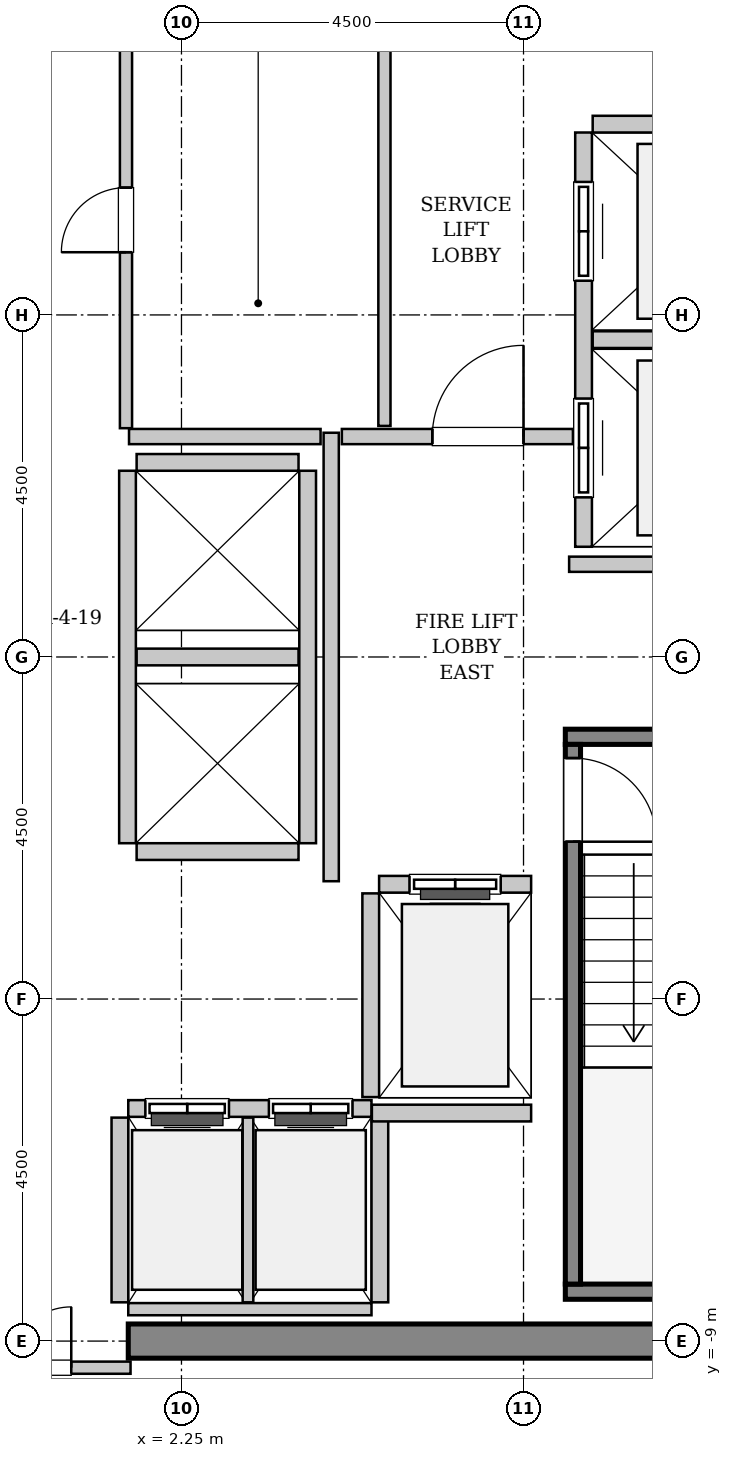
"""IFC4 building model, lengths in metres.
Left out: names, types, materials, properties, quantities, classifications, styles, units other than length and angle.
Written with IfcOpenShell. Run it as: python <this file> out.ifc"""

import sys

from ifc_helpers import new_model, si_unit, direction, frame, frame_2d, origin, place, context, subcontext, project, spatial, rectangle, extrude, source, transform, mapped, element, fill, save


model = new_model("IFC4")
c1 = context("Model", 3, precision=1e-05, world=origin(), true_north=direction((0.0, 1.0)))
c2 = subcontext(c1, "Body", "Model", "MODEL_VIEW")
j1 = project(units=[si_unit("LENGTHUNIT", "METRE"), si_unit("PLANEANGLEUNIT", "RADIAN")], contexts=[c1])
p1 = place(None, origin())
s1 = spatial("IfcSite", under=j1, at=p1, CompositionType="ELEMENT")
p2 = place(p1, origin())
s2 = spatial("IfcBuilding", under=s1, at=p2, CompositionType="ELEMENT")
p3 = place(p2, frame((0.0, 0.0, 229.4)))
s3 = spatial("IfcBuildingStorey", under=s2, at=p3, CompositionType="ELEMENT", Elevation=229.4)
m1 = source(origin(), c2, "Body", "SweptSolid", [
    extrude(rectangle(XDim=9.925, YDim=0.45, at=frame_2d((4.962, 0.0))), origin(), (0.0, 0.0, 1.0), 3.8),
])
p4 = place(p3, frame((1.55, -9.0, 0.0), z_axis=(0.0, 0.0, 1.0), x_axis=(1.0, 0.0, 0.0)))
e1 = element("IfcWall", 1, at=p4, inside=s3, PredefinedType="SHEAR", context=c2, shape_type="MappedRepresentation", body=[
    mapped(m1, transform((0.0, 0.0, 0.0), x_axis=(1.0, 0.0, 0.0), y_axis=(0.0, 1.0, 0.0), z_axis=(0.0, 0.0, 1.0), scale=1.0)),
])
m2 = source(origin(), c2, "Body", "SweptSolid", [
    extrude(rectangle(XDim=3.4, YDim=0.2, at=frame_2d((1.7, 0.0))), origin(), (0.0, 0.0, 1.0), 3.8),
])
p5 = place(p3, frame((7.3, -1.05, 0.0), z_axis=(0.0, 0.0, 1.0), x_axis=(1.0, 0.0, 0.0)))
e2 = element("IfcWall", 2, at=p5, inside=s3, PredefinedType="SOLIDWALL", context=c2, shape_type="MappedRepresentation", body=[
    mapped(m2, transform((0.0, 0.0, 0.0), x_axis=(1.0, 0.0, 0.0), y_axis=(0.0, 1.0, 0.0), z_axis=(0.0, 0.0, 1.0), scale=1.0)),
])
m3 = source(origin(), c2, "Body", "SweptSolid", [
    extrude(rectangle(XDim=3.73, YDim=0.2, at=frame_2d((1.865, 0.0))), origin(), (0.0, 0.0, 1.0), 3.8),
])
p6 = place(p3, frame((7.3, -8.35, 0.0), z_axis=(0.0, 0.0, 1.0), x_axis=(1.0, 0.0, 0.0)))
e3 = element("IfcWall", 3, at=p6, inside=s3, PredefinedType="SOLIDWALL", context=c2, shape_type="MappedRepresentation", body=[
    mapped(m3, transform((0.0, 0.0, 0.0), x_axis=(1.0, 0.0, 0.0), y_axis=(0.0, 1.0, 0.0), z_axis=(0.0, 0.0, 1.0), scale=1.0)),
])
m4 = source(origin(), c2, "Body", "SweptSolid", [
    extrude(rectangle(XDim=7.1, YDim=0.2, at=frame_2d((3.55, 0.0))), origin(), (0.0, 0.0, 1.0), 3.8),
])
p7 = place(p3, frame((7.4, -1.15, 0.0), z_axis=(0.0, 0.0, 1.0), x_axis=(0.0, -1.0, 0.0)))
e4 = element("IfcWall", 4, at=p7, inside=s3, PredefinedType="SOLIDWALL", context=c2, shape_type="MappedRepresentation", body=[
    mapped(m4, transform((0.0, 0.0, 0.0), x_axis=(1.0, 0.0, 0.0), y_axis=(0.0, 1.0, 0.0), z_axis=(0.0, 0.0, 1.0), scale=1.0)),
])
p8 = place(p7, frame((0.18, 0.0, 0.0)))
e5 = element("IfcOpeningElement", 5, at=p8, cuts=e4, PredefinedType="OPENING", context=c2, shape_type="SweptSolid", body=[
    extrude(rectangle(XDim=1.1, YDim=2.15, at=frame_2d((0.55, 1.075))), frame((0.0, 0.11, 0.0), z_axis=(0.0, -1.0, 0.0), x_axis=(1.0, 0.0, 0.0)), (0.0, 0.0, 1.0), 0.22),
])
m5 = source(origin(), c2, "Body", "SweptSolid", [
    extrude(rectangle(XDim=2.0, YDim=0.22, at=frame_2d((1.0, 0.0))), origin(), (0.0, 0.0, 1.0), 3.535),
])
p9 = place(p3, frame((6.85, -2.99, 0.0), z_axis=(0.0, 0.0, 1.0), x_axis=(-1.0, 0.0, 0.0)))
e6 = element("IfcWall", 6, at=p9, inside=s3, PredefinedType="SOLIDWALL", context=c2, shape_type="MappedRepresentation", body=[
    mapped(m5, transform((0.0, 0.0, 0.0), x_axis=(1.0, 0.0, 0.0), y_axis=(0.0, 1.0, 0.0), z_axis=(0.0, 0.0, 1.0), scale=1.0)),
])
p10 = place(p9, frame((0.4, 0.0, 0.0)))
e7 = element("IfcOpeningElement", 7, at=p10, cuts=e6, PredefinedType="OPENING", context=c2, shape_type="SweptSolid", body=[
    extrude(rectangle(XDim=1.2, YDim=2.2, at=frame_2d((0.6, 1.1))), frame((0.0, 0.12, 0.0), z_axis=(0.0, -1.0, 0.0), x_axis=(1.0, 0.0, 0.0)), (0.0, 0.0, 1.0), 0.24),
])
m6 = source(origin(), c2, "Body", "SweptSolid", [
    extrude(rectangle(XDim=2.68, YDim=0.22, at=frame_2d((1.34, 0.0))), origin(), (0.0, 0.0, 1.0), 3.535),
])
p11 = place(p3, frame((4.74, -3.11, 0.0), z_axis=(0.0, 0.0, 1.0), x_axis=(0.0, -1.0, 0.0)))
e8 = element("IfcWall", 8, at=p11, inside=s3, PredefinedType="SOLIDWALL", context=c2, shape_type="MappedRepresentation", body=[
    mapped(m6, transform((0.0, 0.0, 0.0), x_axis=(1.0, 0.0, 0.0), y_axis=(0.0, 1.0, 0.0), z_axis=(0.0, 0.0, 1.0), scale=1.0)),
])
m7 = source(origin(), c2, "Body", "SweptSolid", [
    extrude(rectangle(XDim=5.45, YDim=0.22, at=frame_2d((2.725, 0.0))), origin(), (0.0, 0.0, 1.0), 3.535),
])
p12 = place(p3, frame((7.54, 6.9, 0.0), z_axis=(0.0, 0.0, 1.0), x_axis=(0.0, -1.0, 0.0)))
e9 = element("IfcWall", 9, at=p12, inside=s3, PredefinedType="SOLIDWALL", context=c2, shape_type="MappedRepresentation", body=[
    mapped(m7, transform((0.0, 0.0, 0.0), x_axis=(1.0, 0.0, 0.0), y_axis=(0.0, 1.0, 0.0), z_axis=(0.0, 0.0, 1.0), scale=1.0)),
])
p13 = place(p12, frame((3.5, 0.0, 0.0)))
e10 = element("IfcOpeningElement", 10, at=p13, cuts=e9, PredefinedType="OPENING", context=c2, shape_type="SweptSolid", body=[
    extrude(rectangle(XDim=1.3, YDim=2.3, at=frame_2d((0.65, 1.15))), frame((0.0, 0.12, 0.0), z_axis=(0.0, -1.0, 0.0), x_axis=(1.0, 0.0, 0.0)), (0.0, 0.0, 1.0), 0.24),
])
p14 = place(p12, frame((0.65, 0.0, 0.0)))
e11 = element("IfcOpeningElement", 11, at=p14, cuts=e9, PredefinedType="OPENING", context=c2, shape_type="SweptSolid", body=[
    extrude(rectangle(XDim=1.3, YDim=2.3, at=frame_2d((0.65, 1.15))), frame((0.0, 0.12, 0.0), z_axis=(0.0, -1.0, 0.0), x_axis=(1.0, 0.0, 0.0)), (0.0, 0.0, 1.0), 0.24),
])
m8 = source(origin(), c2, "Body", "SweptSolid", [
    extrude(rectangle(XDim=2.78, YDim=0.22, at=frame_2d((1.39, 0.0))), origin(), (0.0, 0.0, 1.0), 3.535),
])
for number, where, z_axis, x_axis in (
    (12, (7.66, 4.175, 0.0), (0.0, 0.0, 1.0), (1.0, 0.0, 0.0)),
    (13, (10.44, 7.01, 0.0), (0.0, 0.0, 1.0), (-1.0, 0.0, 0.0)),
):
    element("IfcWall", number, at=place(p3, frame(where, z_axis=z_axis, x_axis=x_axis)), inside=s3, PredefinedType="SOLIDWALL", context=c2, shape_type="MappedRepresentation", body=[
        mapped(m8, transform((0.0, 0.0, 0.0), x_axis=(1.0, 0.0, 0.0), y_axis=(0.0, 1.0, 0.0), z_axis=(0.0, 0.0, 1.0), scale=1.0)),
    ])
m9 = source(origin(), c2, "Body", "SweptSolid", [
    extrude(rectangle(XDim=3.2, YDim=0.22, at=frame_2d((1.6, 0.0))), origin(), (0.0, 0.0, 1.0), 3.535),
])
p15 = place(p3, frame((4.75, -5.94, 0.0), z_axis=(0.0, 0.0, 1.0), x_axis=(-1.0, 0.0, 0.0)))
e14 = element("IfcWall", 14, at=p15, inside=s3, PredefinedType="SOLIDWALL", context=c2, shape_type="MappedRepresentation", body=[
    mapped(m9, transform((0.0, 0.0, 0.0), x_axis=(1.0, 0.0, 0.0), y_axis=(0.0, 1.0, 0.0), z_axis=(0.0, 0.0, 1.0), scale=1.0)),
])
p16 = place(p15, frame((1.875, 0.0, 0.0)))
e15 = element("IfcOpeningElement", 15, at=p16, cuts=e14, PredefinedType="OPENING", context=c2, shape_type="SweptSolid", body=[
    extrude(rectangle(XDim=1.1, YDim=2.2, at=frame_2d((0.55, 1.1))), frame((0.0, 0.12, 0.0), z_axis=(0.0, -1.0, 0.0), x_axis=(1.0, 0.0, 0.0)), (0.0, 0.0, 1.0), 0.24),
])
p17 = place(p15, frame((0.25, 0.0, 0.0)))
e16 = element("IfcOpeningElement", 16, at=p17, cuts=e14, PredefinedType="OPENING", context=c2, shape_type="SweptSolid", body=[
    extrude(rectangle(XDim=1.1, YDim=2.2, at=frame_2d((0.55, 1.1))), frame((0.0, 0.12, 0.0), z_axis=(0.0, -1.0, 0.0), x_axis=(1.0, 0.0, 0.0)), (0.0, 0.0, 1.0), 0.24),
])
m10 = source(origin(), c2, "Body", "SweptSolid", [
    extrude(rectangle(XDim=3.2, YDim=0.16, at=frame_2d((1.6, 0.0))), origin(), (0.0, 0.0, 1.0), 2.625),
])
p18 = place(p3, frame((1.55, -8.58, 0.0), z_axis=(0.0, 0.0, 1.0), x_axis=(1.0, 0.0, 0.0)))
e17 = element("IfcWall", 17, at=p18, inside=s3, PredefinedType="PARTITIONING", context=c2, shape_type="MappedRepresentation", body=[
    mapped(m10, transform((0.0, 0.0, 0.0), x_axis=(1.0, 0.0, 0.0), y_axis=(0.0, 1.0, 0.0), z_axis=(0.0, 0.0, 1.0), scale=1.0)),
])
m11 = source(origin(), c2, "Body", "SweptSolid", [
    extrude(rectangle(XDim=2.43, YDim=0.22, at=frame_2d((1.215, 0.0))), origin(), (0.0, 0.0, 1.0), 3.535),
])
p19 = place(p3, frame((1.44, -6.06, 0.0), z_axis=(0.0, 0.0, 1.0), x_axis=(0.0, -1.0, 0.0)))
e18 = element("IfcWall", 18, at=p19, inside=s3, PredefinedType="SOLIDWALL", context=c2, shape_type="MappedRepresentation", body=[
    mapped(m11, transform((0.0, 0.0, 0.0), x_axis=(1.0, 0.0, 0.0), y_axis=(0.0, 1.0, 0.0), z_axis=(0.0, 0.0, 1.0), scale=1.0)),
])
m12 = source(origin(), c2, "Body", "SweptSolid", [
    extrude(rectangle(XDim=2.43, YDim=0.14, at=frame_2d((1.215, 0.0))), origin(), (0.0, 0.0, 1.0), 3.535),
])
p20 = place(p3, frame((3.125, -8.49, 0.0), z_axis=(0.0, 0.0, 1.0), x_axis=(0.0, 1.0, 0.0)))
e19 = element("IfcWall", 19, at=p20, inside=s3, PredefinedType="PARTITIONING", context=c2, shape_type="MappedRepresentation", body=[
    mapped(m12, transform((0.0, 0.0, 0.0), x_axis=(1.0, 0.0, 0.0), y_axis=(0.0, 1.0, 0.0), z_axis=(0.0, 0.0, 1.0), scale=1.0)),
])
p21 = place(p3, frame((4.86, -8.49, 0.0), z_axis=(0.0, 0.0, 1.0), x_axis=(0.0, 1.0, 0.0)))
e20 = element("IfcWall", 20, at=p21, inside=s3, PredefinedType="SOLIDWALL", context=c2, shape_type="MappedRepresentation", body=[
    mapped(m11, transform((0.0, 0.0, 0.0), x_axis=(1.0, 0.0, 0.0), y_axis=(0.0, 1.0, 0.0), z_axis=(0.0, 0.0, 1.0), scale=1.0)),
])
m13 = source(origin(), c2, "Body", "SweptSolid", [
    extrude(rectangle(XDim=4.9, YDim=0.22, at=frame_2d((2.45, 0.0))), origin(), (0.0, 0.0, 1.0), 3.535),
])
for number, where, z_axis, x_axis in (
    (21, (1.54, 2.45, 0.0), (0.0, 0.0, 1.0), (0.0, -1.0, 0.0)),
    (22, (3.91, -2.45, 0.0), (0.0, 0.0, 1.0), (0.0, 1.0, 0.0)),
):
    element("IfcWall", number, at=place(p3, frame(where, z_axis=z_axis, x_axis=x_axis)), inside=s3, PredefinedType="SOLIDWALL", context=c2, shape_type="MappedRepresentation", body=[
        mapped(m13, transform((0.0, 0.0, 0.0), x_axis=(1.0, 0.0, 0.0), y_axis=(0.0, 1.0, 0.0), z_axis=(0.0, 0.0, 1.0), scale=1.0)),
    ])
m14 = source(origin(), c2, "Body", "SweptSolid", [
    extrude(rectangle(XDim=2.13, YDim=0.22, at=frame_2d((1.065, 0.0))), origin(), (0.0, 0.0, 1.0), 3.535),
])
for number, where, z_axis, x_axis in (
    (23, (1.66, -2.56, 0.0), (0.0, 0.0, 1.0), (1.0, 0.0, 0.0)),
    (24, (1.66, 0.0, 0.0), (0.0, 0.0, 1.0), (1.0, 0.0, 0.0)),
    (25, (3.79, 2.56, 0.0), (0.0, 0.0, 1.0), (-1.0, 0.0, 0.0)),
):
    element("IfcWall", number, at=place(p3, frame(where, z_axis=z_axis, x_axis=x_axis)), inside=s3, PredefinedType="SOLIDWALL", context=c2, shape_type="MappedRepresentation", body=[
        mapped(m14, transform((0.0, 0.0, 0.0), x_axis=(1.0, 0.0, 0.0), y_axis=(0.0, 1.0, 0.0), z_axis=(0.0, 0.0, 1.0), scale=1.0)),
    ])
m15 = source(origin(), c2, "Body", "SweptSolid", [
    extrude(rectangle(XDim=2.095, YDim=0.22, at=frame_2d((1.048, 0.0))), origin(), (0.0, 0.0, 1.0), 3.535),
])
p22 = place(p3, frame((4.755, -6.0, 0.0), z_axis=(0.0, 0.0, 1.0), x_axis=(1.0, 0.0, 0.0)))
e26 = element("IfcWall", 26, at=p22, inside=s3, PredefinedType="SOLIDWALL", context=c2, shape_type="MappedRepresentation", body=[
    mapped(m15, transform((0.0, 0.0, 0.0), x_axis=(1.0, 0.0, 0.0), y_axis=(0.0, 1.0, 0.0), z_axis=(0.0, 0.0, 1.0), scale=1.0)),
])
m16 = source(origin(), c2, "Body", "SweptSolid", [
    extrude(rectangle(XDim=5.9, YDim=0.2, at=frame_2d((2.95, 0.0))), origin(), (0.0, 0.0, 1.0), 3.535),
])
p23 = place(p3, frame((4.22, -2.95, 0.0), z_axis=(0.0, 0.0, 1.0), x_axis=(0.0, 1.0, 0.0)))
e27 = element("IfcWall", 27, at=p23, inside=s3, PredefinedType="PARTITIONING", context=c2, shape_type="MappedRepresentation", body=[
    mapped(m16, transform((0.0, 0.0, 0.0), x_axis=(1.0, 0.0, 0.0), y_axis=(0.0, 1.0, 0.0), z_axis=(0.0, 0.0, 1.0), scale=1.0)),
])
m17 = source(origin(), c2, "Body", "SweptSolid", [
    extrude(rectangle(XDim=2.52, YDim=0.2, at=frame_2d((1.26, 0.0))), origin(), (0.0, 0.0, 1.0), 3.535),
])
p24 = place(p3, frame((1.56, 2.9, 0.0), z_axis=(0.0, 0.0, 1.0), x_axis=(1.0, 0.0, 0.0)))
e28 = element("IfcWall", 28, at=p24, inside=s3, PredefinedType="PARTITIONING", context=c2, shape_type="MappedRepresentation", body=[
    mapped(m17, transform((0.0, 0.0, 0.0), x_axis=(1.0, 0.0, 0.0), y_axis=(0.0, 1.0, 0.0), z_axis=(0.0, 0.0, 1.0), scale=1.0)),
])
m18 = source(origin(), c2, "Body", "SweptSolid", [
    extrude(rectangle(XDim=3.04, YDim=0.2, at=frame_2d((1.52, 0.0))), origin(), (0.0, 0.0, 1.0), 3.535),
])
p25 = place(p3, frame((4.36, 2.9, 0.0), z_axis=(0.0, 0.0, 1.0), x_axis=(1.0, 0.0, 0.0)))
e29 = element("IfcWall", 29, at=p25, inside=s3, PredefinedType="PARTITIONING", context=c2, shape_type="MappedRepresentation", body=[
    mapped(m18, transform((0.0, 0.0, 0.0), x_axis=(1.0, 0.0, 0.0), y_axis=(0.0, 1.0, 0.0), z_axis=(0.0, 0.0, 1.0), scale=1.0)),
])
p26 = place(p25, frame((1.19, 0.0, 0.0)))
e30 = element("IfcOpeningElement", 30, at=p26, cuts=e29, PredefinedType="OPENING", context=c2, shape_type="SweptSolid", body=[
    extrude(rectangle(XDim=1.2, YDim=2.15, at=frame_2d((0.6, 1.075))), frame((0.0, 0.11, 0.0), z_axis=(0.0, -1.0, 0.0), x_axis=(1.0, 0.0, 0.0)), (0.0, 0.0, 1.0), 0.22),
])
m19 = source(origin(), c2, "Body", "SweptSolid", [
    extrude(rectangle(XDim=4.11, YDim=0.2, at=frame_2d((2.055, 0.0))), origin(), (0.0, 0.0, 1.0), 3.535),
])
p27 = place(p3, frame((7.35, 1.22, 0.0), z_axis=(0.0, 0.0, 1.0), x_axis=(1.0, 0.0, 0.0)))
e31 = element("IfcWall", 31, at=p27, inside=s3, PredefinedType="PARTITIONING", context=c2, shape_type="MappedRepresentation", body=[
    mapped(m19, transform((0.0, 0.0, 0.0), x_axis=(1.0, 0.0, 0.0), y_axis=(0.0, 1.0, 0.0), z_axis=(0.0, 0.0, 1.0), scale=1.0)),
])
m20 = source(origin(), c2, "Body", "SweptSolid", [
    extrude(rectangle(XDim=3.16, YDim=0.16, at=frame_2d((1.58, 0.0))), origin(), (0.0, 0.0, 1.0), 2.625),
])
p28 = place(p3, frame((-1.58, -9.35, 0.0), z_axis=(0.0, 0.0, 1.0), x_axis=(1.0, 0.0, 0.0)))
e32 = element("IfcWall", 32, at=p28, inside=s3, PredefinedType="PARTITIONING", context=c2, shape_type="MappedRepresentation", body=[
    mapped(m20, transform((0.0, 0.0, 0.0), x_axis=(1.0, 0.0, 0.0), y_axis=(0.0, 1.0, 0.0), z_axis=(0.0, 0.0, 1.0), scale=1.0)),
])
p29 = place(p28, frame((0.78, 0.0, 0.0)))
e33 = element("IfcOpeningElement", 33, at=p29, cuts=e32, PredefinedType="OPENING", context=c2, shape_type="SweptSolid", body=[
    extrude(rectangle(XDim=1.6, YDim=2.3, at=frame_2d((0.8, 1.15))), frame((0.0, 0.09, 0.0), z_axis=(0.0, -1.0, 0.0), x_axis=(1.0, 0.0, 0.0)), (0.0, 0.0, 1.0), 0.18),
])
m21 = source(origin(), c2, "Body", "SweptSolid", [
    extrude(rectangle(XDim=5.45, YDim=0.16, at=frame_2d((2.725, 0.0))), origin(), (0.0, 0.0, 1.0), 3.535),
])
p30 = place(p3, frame((4.92, 3.04, 0.0), z_axis=(0.0, 0.0, 1.0), x_axis=(0.0, 1.0, 0.0)))
e34 = element("IfcWall", 34, at=p30, inside=s3, PredefinedType="PARTITIONING", context=c2, shape_type="MappedRepresentation", body=[
    mapped(m21, transform((0.0, 0.0, 0.0), x_axis=(1.0, 0.0, 0.0), y_axis=(0.0, 1.0, 0.0), z_axis=(0.0, 0.0, 1.0), scale=1.0)),
])
m22 = source(origin(), c2, "Body", "SweptSolid", [
    extrude(rectangle(XDim=5.48, YDim=0.16, at=frame_2d((2.74, 0.0))), origin(), (0.0, 0.0, 1.0), 3.535),
])
p31 = place(p3, frame((1.52, 3.01, 0.0), z_axis=(0.0, 0.0, 1.0), x_axis=(0.0, 1.0, 0.0)))
e35 = element("IfcWall", 35, at=p31, inside=s3, PredefinedType="PARTITIONING", context=c2, shape_type="MappedRepresentation", body=[
    mapped(m22, transform((0.0, 0.0, 0.0), x_axis=(1.0, 0.0, 0.0), y_axis=(0.0, 1.0, 0.0), z_axis=(0.0, 0.0, 1.0), scale=1.0)),
])
p32 = place(p31, frame((2.315, 0.0, 0.0)))
e36 = element("IfcOpeningElement", 36, at=p32, cuts=e35, PredefinedType="OPENING", context=c2, shape_type="SweptSolid", body=[
    extrude(rectangle(XDim=0.85, YDim=2.1, at=frame_2d((0.425, 1.05))), frame((0.0, 0.09, 0.0), z_axis=(0.0, -1.0, 0.0), x_axis=(1.0, 0.0, 0.0)), (0.0, 0.0, 1.0), 0.18),
])
m23 = source(origin(), c2, "Body", "SweptSolid", [
    extrude(rectangle(XDim=1.1, YDim=2.15, at=frame_2d((0.55, 1.075))), frame((0.0, 0.025, 0.0), z_axis=(0.0, -1.0, 0.0), x_axis=(1.0, 0.0, 0.0)), (0.0, 0.0, 1.0), 0.05),
])
p33 = place(p8, origin())
e37 = element("IfcDoor", 37, at=p33, inside=s3, OperationType="SINGLE_SWING_RIGHT", PredefinedType="DOOR", context=c2, shape_type="MappedRepresentation", body=[
    mapped(m23, transform((0.0, 0.0, 0.0), x_axis=(1.0, 0.0, 0.0), y_axis=(0.0, 1.0, 0.0), z_axis=(0.0, 0.0, 1.0), scale=1.0)),
])
fill(e5, e37)
m24 = source(origin(), c2, "Body", "SweptSolid", [
    extrude(rectangle(XDim=1.2, YDim=2.2, at=frame_2d((0.6, 1.1))), frame((0.0, 0.025, 0.0), z_axis=(0.0, -1.0, 0.0), x_axis=(1.0, 0.0, 0.0)), (0.0, 0.0, 1.0), 0.05),
])
p34 = place(p10, origin())
e38 = element("IfcDoor", 38, at=p34, inside=s3, OperationType="SLIDING_TO_LEFT", PredefinedType="DOOR", context=c2, shape_type="MappedRepresentation", body=[
    mapped(m24, transform((0.0, 0.0, 0.0), x_axis=(1.0, 0.0, 0.0), y_axis=(0.0, 1.0, 0.0), z_axis=(0.0, 0.0, 1.0), scale=1.0)),
])
fill(e7, e38)
m25 = source(origin(), c2, "Body", "SweptSolid", [
    extrude(rectangle(XDim=1.3, YDim=2.3, at=frame_2d((0.65, 1.15))), frame((0.0, 0.025, 0.0), z_axis=(0.0, -1.0, 0.0), x_axis=(1.0, 0.0, 0.0)), (0.0, 0.0, 1.0), 0.05),
])
p35 = place(p13, origin())
e39 = element("IfcDoor", 39, at=p35, inside=s3, OperationType="SLIDING_TO_RIGHT", PredefinedType="DOOR", context=c2, shape_type="MappedRepresentation", body=[
    mapped(m25, transform((0.0, 0.0, 0.0), x_axis=(1.0, 0.0, 0.0), y_axis=(0.0, 1.0, 0.0), z_axis=(0.0, 0.0, 1.0), scale=1.0)),
])
fill(e10, e39)
p36 = place(p14, origin())
e40 = element("IfcDoor", 40, at=p36, inside=s3, OperationType="SLIDING_TO_RIGHT", PredefinedType="DOOR", context=c2, shape_type="MappedRepresentation", body=[
    mapped(m25, transform((0.0, 0.0, 0.0), x_axis=(1.0, 0.0, 0.0), y_axis=(0.0, 1.0, 0.0), z_axis=(0.0, 0.0, 1.0), scale=1.0)),
])
fill(e11, e40)
m26 = source(origin(), c2, "Body", "SweptSolid", [
    extrude(rectangle(XDim=1.1, YDim=2.2, at=frame_2d((0.55, 1.1))), frame((0.0, 0.025, 0.0), z_axis=(0.0, -1.0, 0.0), x_axis=(1.0, 0.0, 0.0)), (0.0, 0.0, 1.0), 0.05),
])
p37 = place(p16, origin())
e41 = element("IfcDoor", 41, at=p37, inside=s3, OperationType="DOUBLE_DOOR_SLIDING", PredefinedType="DOOR", context=c2, shape_type="MappedRepresentation", body=[
    mapped(m26, transform((0.0, 0.0, 0.0), x_axis=(1.0, 0.0, 0.0), y_axis=(0.0, 1.0, 0.0), z_axis=(0.0, 0.0, 1.0), scale=1.0)),
])
fill(e15, e41)
p38 = place(p17, origin())
e42 = element("IfcDoor", 42, at=p38, inside=s3, OperationType="DOUBLE_DOOR_SLIDING", PredefinedType="DOOR", context=c2, shape_type="MappedRepresentation", body=[
    mapped(m26, transform((0.0, 0.0, 0.0), x_axis=(1.0, 0.0, 0.0), y_axis=(0.0, 1.0, 0.0), z_axis=(0.0, 0.0, 1.0), scale=1.0)),
])
fill(e16, e42)
m27 = source(origin(), c2, "Body", "SweptSolid", [
    extrude(rectangle(XDim=1.2, YDim=2.15, at=frame_2d((0.6, 1.075))), frame((0.0, 0.025, 0.0), z_axis=(0.0, -1.0, 0.0), x_axis=(1.0, 0.0, 0.0)), (0.0, 0.0, 1.0), 0.05),
])
p39 = place(p26, origin())
e43 = element("IfcDoor", 43, at=p39, inside=s3, OperationType="SINGLE_SWING_RIGHT", PredefinedType="DOOR", context=c2, shape_type="MappedRepresentation", body=[
    mapped(m27, transform((0.0, 0.0, 0.0), x_axis=(1.0, 0.0, 0.0), y_axis=(0.0, 1.0, 0.0), z_axis=(0.0, 0.0, 1.0), scale=1.0)),
])
fill(e30, e43)
m28 = source(origin(), c2, "Body", "SweptSolid", [
    extrude(rectangle(XDim=1.6, YDim=2.3, at=frame_2d((0.8, 1.15))), frame((0.0, 0.025, 0.0), z_axis=(0.0, -1.0, 0.0), x_axis=(1.0, 0.0, 0.0)), (0.0, 0.0, 1.0), 0.05),
])
p40 = place(p29, origin())
e44 = element("IfcDoor", 44, at=p40, inside=s3, OperationType="DOUBLE_DOOR_SINGLE_SWING", PredefinedType="DOOR", context=c2, shape_type="MappedRepresentation", body=[
    mapped(m28, transform((0.0, 0.0, 0.0), x_axis=(1.0, 0.0, 0.0), y_axis=(0.0, 1.0, 0.0), z_axis=(0.0, 0.0, 1.0), scale=1.0)),
])
fill(e33, e44)
m29 = source(origin(), c2, "Body", "SweptSolid", [
    extrude(rectangle(XDim=0.85, YDim=2.1, at=frame_2d((0.425, 1.05))), frame((0.0, 0.025, 0.0), z_axis=(0.0, -1.0, 0.0), x_axis=(1.0, 0.0, 0.0)), (0.0, 0.0, 1.0), 0.05),
])
p41 = place(p32, origin())
e45 = element("IfcDoor", 45, at=p41, inside=s3, OperationType="SINGLE_SWING_LEFT", PredefinedType="DOOR", context=c2, shape_type="MappedRepresentation", body=[
    mapped(m29, transform((0.0, 0.0, 0.0), x_axis=(1.0, 0.0, 0.0), y_axis=(0.0, 1.0, 0.0), z_axis=(0.0, 0.0, 1.0), scale=1.0)),
])
fill(e36, e45)
save(model, sys.argv[1])
